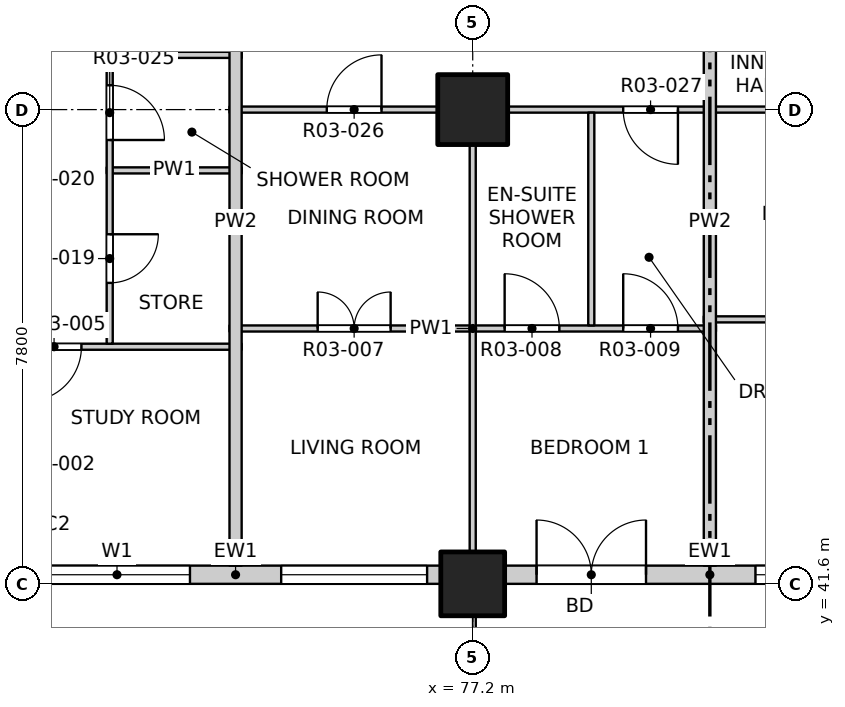
"""IFC4 building model, lengths in metres.
Left out: names, types, materials, properties, quantities, classifications, styles, units other than length and angle.
Written with IfcOpenShell. Run it as: python <this file> out.ifc"""

import sys

from ifc_helpers import new_model, si_unit, direction, frame, frame_2d, origin, origin_2d, place, context, subcontext, project, spatial, rectangle, extrude, element, fill, save


model = new_model("IFC4")
c1 = context("Model", 3, precision=1e-05, world=origin(), true_north=direction((0.0, 1.0)))
c2 = subcontext(c1, "Body", "Model", "MODEL_VIEW")
j1 = project(units=[si_unit("LENGTHUNIT", "METRE"), si_unit("PLANEANGLEUNIT", "RADIAN")], contexts=[c1])
p1 = place(None, origin())
s1 = spatial("IfcSite", under=j1, at=p1, CompositionType="ELEMENT")
p2 = place(p1, origin())
s2 = spatial("IfcBuilding", under=s1, at=p2, CompositionType="ELEMENT")
p3 = place(p2, frame((0.0, 0.0, 39.9)))
s3 = spatial("IfcBuildingStorey", under=s2, at=p3, CompositionType="ELEMENT", Elevation=39.9)
p4 = place(p3, frame((77.2, 41.6, -0.25), z_axis=(0.0, 0.0, 1.0), x_axis=(1.0, 0.0, 0.0)))
e1 = element("IfcColumn", 1, at=p4, inside=s3, PredefinedType="COLUMN", context=c2, shape_type="SweptSolid", body=[
    extrude(rectangle(XDim=1.05, YDim=1.05, at=origin_2d()), origin(), (0.0, 0.0, 1.0), 3.4),
])
p5 = place(p3, frame((77.2, 49.4, -0.25), z_axis=(0.0, 0.0, 1.0), x_axis=(1.0, 0.0, 0.0)))
e2 = element("IfcColumn", 2, at=p5, inside=s3, PredefinedType="COLUMN", context=c2, shape_type="SweptSolid", body=[
    extrude(rectangle(XDim=1.15, YDim=1.15, at=origin_2d()), origin(), (0.0, 0.0, 1.0), 3.4),
])
p6 = place(p3, frame((69.925, 41.75, 0.0), z_axis=(0.0, 0.0, 1.0), x_axis=(1.0, 0.0, 0.0)))
e3 = element("IfcWall", 3, at=p6, inside=s3, PredefinedType="SOLIDWALL", context=c2, shape_type="SweptSolid", body=[
    extrude(rectangle(XDim=6.75, YDim=0.3, at=frame_2d((3.375, 0.0))), origin(), (0.0, 0.0, 1.0), 2.7),
])
p7 = place(p6, frame((0.225, 0.0, 0.9)))
e4 = element("IfcOpeningElement", 4, at=p7, cuts=e3, PredefinedType="OPENING", context=c2, shape_type="SweptSolid", body=[
    extrude(rectangle(XDim=2.4, YDim=1.8, at=frame_2d((1.2, 0.9))), frame((0.0, 0.16, 0.0), z_axis=(0.0, -1.0, 0.0), x_axis=(1.0, 0.0, 0.0)), (0.0, 0.0, 1.0), 0.32),
])
p8 = place(p6, frame((4.125, 0.0, 0.9)))
e5 = element("IfcOpeningElement", 5, at=p8, cuts=e3, PredefinedType="OPENING", context=c2, shape_type="SweptSolid", body=[
    extrude(rectangle(XDim=2.4, YDim=1.8, at=frame_2d((1.2, 0.9))), frame((0.0, 0.16, 0.0), z_axis=(0.0, -1.0, 0.0), x_axis=(1.0, 0.0, 0.0)), (0.0, 0.0, 1.0), 0.32),
])
p9 = place(p3, frame((77.725, 41.75, 0.0), z_axis=(0.0, 0.0, 1.0), x_axis=(1.0, 0.0, 0.0)))
e6 = element("IfcWall", 6, at=p9, inside=s3, PredefinedType="SOLIDWALL", context=c2, shape_type="SweptSolid", body=[
    extrude(rectangle(XDim=6.75, YDim=0.3, at=frame_2d((3.375, 0.0))), origin(), (0.0, 0.0, 1.0), 2.7),
])
p10 = place(p9, frame((0.525, 0.0, 0.0)))
e7 = element("IfcOpeningElement", 7, at=p10, cuts=e6, PredefinedType="OPENING", context=c2, shape_type="SweptSolid", body=[
    extrude(rectangle(XDim=1.8, YDim=2.4, at=frame_2d((0.9, 1.2))), frame((0.0, 0.16, 0.0), z_axis=(0.0, -1.0, 0.0), x_axis=(1.0, 0.0, 0.0)), (0.0, 0.0, 1.0), 0.32),
])
p11 = place(p9, frame((4.125, 0.0, 0.9)))
e8 = element("IfcOpeningElement", 8, at=p11, cuts=e6, PredefinedType="OPENING", context=c2, shape_type="SweptSolid", body=[
    extrude(rectangle(XDim=2.4, YDim=1.8, at=frame_2d((1.2, 0.9))), frame((0.0, 0.16, 0.0), z_axis=(0.0, -1.0, 0.0), x_axis=(1.0, 0.0, 0.0)), (0.0, 0.0, 1.0), 0.32),
])
p12 = place(p3, frame((61.9, 45.5, 0.0), z_axis=(0.0, 0.0, 1.0), x_axis=(1.0, 0.0, 0.0)))
e9 = element("IfcWall", 9, at=p12, inside=s3, PredefinedType="PARTITIONING", context=c2, shape_type="SweptSolid", body=[
    extrude(rectangle(XDim=11.5, YDim=0.1, at=frame_2d((5.75, 0.0))), origin(), (0.0, 0.0, 1.0), 3.15),
])
p13 = place(p12, frame((7.965, 0.0, 0.0)))
e10 = element("IfcOpeningElement", 10, at=p13, cuts=e9, PredefinedType="OPENING", context=c2, shape_type="SweptSolid", body=[
    extrude(rectangle(XDim=0.9, YDim=2.1, at=frame_2d((0.45, 1.05))), frame((0.0, 0.06, 0.0), z_axis=(0.0, -1.0, 0.0), x_axis=(1.0, 0.0, 0.0)), (0.0, 0.0, 1.0), 0.12),
])
p14 = place(p3, frame((73.2, 45.8, 0.0), z_axis=(0.0, 0.0, 1.0), x_axis=(1.0, 0.0, 0.0)))
e11 = element("IfcWall", 11, at=p14, inside=s3, PredefinedType="PARTITIONING", context=c2, shape_type="SweptSolid", body=[
    extrude(rectangle(XDim=8.0, YDim=0.1, at=frame_2d((4.0, 0.0))), origin(), (0.0, 0.0, 1.0), 3.15),
])
p15 = place(p14, frame((1.45, 0.0, 0.0)))
e12 = element("IfcOpeningElement", 12, at=p15, cuts=e11, PredefinedType="OPENING", context=c2, shape_type="SweptSolid", body=[
    extrude(rectangle(XDim=1.2, YDim=2.1, at=frame_2d((0.6, 1.05))), frame((0.0, 0.06, 0.0), z_axis=(0.0, -1.0, 0.0), x_axis=(1.0, 0.0, 0.0)), (0.0, 0.0, 1.0), 0.12),
])
p16 = place(p14, frame((4.525, 0.0, 0.0)))
e13 = element("IfcOpeningElement", 13, at=p16, cuts=e11, PredefinedType="OPENING", context=c2, shape_type="SweptSolid", body=[
    extrude(rectangle(XDim=0.9, YDim=2.1, at=frame_2d((0.45, 1.05))), frame((0.0, 0.06, 0.0), z_axis=(0.0, -1.0, 0.0), x_axis=(1.0, 0.0, 0.0)), (0.0, 0.0, 1.0), 0.12),
])
p17 = place(p14, frame((6.475, 0.0, 0.0)))
e14 = element("IfcOpeningElement", 14, at=p17, cuts=e11, PredefinedType="OPENING", context=c2, shape_type="SweptSolid", body=[
    extrude(rectangle(XDim=0.9, YDim=2.1, at=frame_2d((0.45, 1.05))), frame((0.0, 0.06, 0.0), z_axis=(0.0, -1.0, 0.0), x_axis=(1.0, 0.0, 0.0)), (0.0, 0.0, 1.0), 0.12),
])
p18 = place(p3, frame((81.0, 45.95, 0.0), z_axis=(0.0, 0.0, 1.0), x_axis=(1.0, 0.0, 0.0)))
e15 = element("IfcWall", 15, at=p18, inside=s3, PredefinedType="PARTITIONING", context=c2, shape_type="SweptSolid", body=[
    extrude(rectangle(XDim=8.0, YDim=0.1, at=frame_2d((4.0, 0.0))), origin(), (0.0, 0.0, 1.0), 3.15),
])
p19 = place(p18, frame((1.45, 0.0, 0.0)))
e16 = element("IfcOpeningElement", 16, at=p19, cuts=e15, PredefinedType="OPENING", context=c2, shape_type="SweptSolid", body=[
    extrude(rectangle(XDim=1.2, YDim=2.1, at=frame_2d((0.6, 1.05))), frame((0.0, 0.06, 0.0), z_axis=(0.0, -1.0, 0.0), x_axis=(1.0, 0.0, 0.0)), (0.0, 0.0, 1.0), 0.12),
])
p20 = place(p18, frame((4.525, 0.0, 0.0)))
e17 = element("IfcOpeningElement", 17, at=p20, cuts=e15, PredefinedType="OPENING", context=c2, shape_type="SweptSolid", body=[
    extrude(rectangle(XDim=0.9, YDim=2.1, at=frame_2d((0.45, 1.05))), frame((0.0, 0.06, 0.0), z_axis=(0.0, -1.0, 0.0), x_axis=(1.0, 0.0, 0.0)), (0.0, 0.0, 1.0), 0.12),
])
p21 = place(p18, frame((6.475, 0.0, 0.0)))
e18 = element("IfcOpeningElement", 18, at=p21, cuts=e15, PredefinedType="OPENING", context=c2, shape_type="SweptSolid", body=[
    extrude(rectangle(XDim=0.9, YDim=2.1, at=frame_2d((0.45, 1.05))), frame((0.0, 0.06, 0.0), z_axis=(0.0, -1.0, 0.0), x_axis=(1.0, 0.0, 0.0)), (0.0, 0.0, 1.0), 0.12),
])
p22 = place(p3, frame((71.18, 48.4, 0.0), z_axis=(0.0, 0.0, 1.0), x_axis=(1.0, 0.0, 0.0)))
e19 = element("IfcWall", 19, at=p22, inside=s3, PredefinedType="PARTITIONING", context=c2, shape_type="SweptSolid", body=[
    extrude(rectangle(XDim=2.22, YDim=0.1, at=frame_2d((1.11, 0.0))), origin(), (0.0, 0.0, 1.0), 3.15),
])
p23 = place(p3, frame((73.2, 49.4, 0.0), z_axis=(0.0, 0.0, 1.0), x_axis=(1.0, 0.0, 0.0)))
e20 = element("IfcWall", 20, at=p23, inside=s3, PredefinedType="PARTITIONING", context=c2, shape_type="SweptSolid", body=[
    extrude(rectangle(XDim=23.6, YDim=0.1, at=frame_2d((11.8, 0.0))), origin(), (0.0, 0.0, 1.0), 3.15),
])
p24 = place(p23, frame((1.6, 0.0, 0.0)))
e21 = element("IfcOpeningElement", 21, at=p24, cuts=e20, PredefinedType="OPENING", context=c2, shape_type="SweptSolid", body=[
    extrude(rectangle(XDim=0.9, YDim=2.1, at=frame_2d((0.45, 1.05))), frame((0.0, 0.06, 0.0), z_axis=(0.0, -1.0, 0.0), x_axis=(1.0, 0.0, 0.0)), (0.0, 0.0, 1.0), 0.12),
])
p25 = place(p23, frame((6.475, 0.0, 0.0)))
e22 = element("IfcOpeningElement", 22, at=p25, cuts=e20, PredefinedType="OPENING", context=c2, shape_type="SweptSolid", body=[
    extrude(rectangle(XDim=0.9, YDim=2.1, at=frame_2d((0.45, 1.05))), frame((0.0, 0.06, 0.0), z_axis=(0.0, -1.0, 0.0), x_axis=(1.0, 0.0, 0.0)), (0.0, 0.0, 1.0), 0.12),
])
p26 = place(p23, frame((9.4, 0.0, 0.0)))
e23 = element("IfcOpeningElement", 23, at=p26, cuts=e20, PredefinedType="OPENING", context=c2, shape_type="SweptSolid", body=[
    extrude(rectangle(XDim=0.9, YDim=2.1, at=frame_2d((0.45, 1.05))), frame((0.0, 0.06, 0.0), z_axis=(0.0, -1.0, 0.0), x_axis=(1.0, 0.0, 0.0)), (0.0, 0.0, 1.0), 0.12),
])
p27 = place(p23, frame((14.275, 0.0, 0.0)))
e24 = element("IfcOpeningElement", 24, at=p27, cuts=e20, PredefinedType="OPENING", context=c2, shape_type="SweptSolid", body=[
    extrude(rectangle(XDim=0.9, YDim=2.1, at=frame_2d((0.45, 1.05))), frame((0.0, 0.06, 0.0), z_axis=(0.0, -1.0, 0.0), x_axis=(1.0, 0.0, 0.0)), (0.0, 0.0, 1.0), 0.12),
])
p28 = place(p23, frame((18.0, 0.0, 0.0)))
e25 = element("IfcOpeningElement", 25, at=p28, cuts=e20, PredefinedType="OPENING", context=c2, shape_type="SweptSolid", body=[
    extrude(rectangle(XDim=0.9, YDim=2.1, at=frame_2d((0.45, 1.05))), frame((0.0, 0.06, 0.0), z_axis=(0.0, -1.0, 0.0), x_axis=(1.0, 0.0, 0.0)), (0.0, 0.0, 1.0), 0.12),
])
p29 = place(p23, frame((21.1, 0.0, 0.0)))
e26 = element("IfcOpeningElement", 26, at=p29, cuts=e20, PredefinedType="OPENING", context=c2, shape_type="SweptSolid", body=[
    extrude(rectangle(XDim=0.9, YDim=2.1, at=frame_2d((0.45, 1.05))), frame((0.0, 0.06, 0.0), z_axis=(0.0, -1.0, 0.0), x_axis=(1.0, 0.0, 0.0)), (0.0, 0.0, 1.0), 0.12),
])
p30 = place(p3, frame((71.18, 50.3, 0.0), z_axis=(0.0, 0.0, 1.0), x_axis=(1.0, 0.0, 0.0)))
e27 = element("IfcWall", 27, at=p30, inside=s3, PredefinedType="PARTITIONING", context=c2, shape_type="SweptSolid", body=[
    extrude(rectangle(XDim=2.22, YDim=0.1, at=frame_2d((1.11, 0.0))), origin(), (0.0, 0.0, 1.0), 3.15),
])
p31 = place(p3, frame((71.23, 45.55, 0.0), z_axis=(0.0, 0.0, 1.0), x_axis=(0.0, 1.0, 0.0)))
e28 = element("IfcWall", 28, at=p31, inside=s3, PredefinedType="PARTITIONING", context=c2, shape_type="SweptSolid", body=[
    extrude(rectangle(XDim=12.3, YDim=0.1, at=frame_2d((6.15, 0.0))), origin(), (0.0, 0.0, 1.0), 3.15),
])
p32 = place(p31, frame((1.0, 0.0, 0.0)))
e29 = element("IfcOpeningElement", 29, at=p32, cuts=e28, PredefinedType="OPENING", context=c2, shape_type="SweptSolid", body=[
    extrude(rectangle(XDim=0.8, YDim=2.1, at=frame_2d((0.4, 1.05))), frame((0.0, 0.06, 0.0), z_axis=(0.0, -1.0, 0.0), x_axis=(1.0, 0.0, 0.0)), (0.0, 0.0, 1.0), 0.12),
])
p33 = place(p31, frame((3.35, 0.0, 0.0)))
e30 = element("IfcOpeningElement", 30, at=p33, cuts=e28, PredefinedType="OPENING", context=c2, shape_type="SweptSolid", body=[
    extrude(rectangle(XDim=0.9, YDim=2.1, at=frame_2d((0.45, 1.05))), frame((0.0, 0.06, 0.0), z_axis=(0.0, -1.0, 0.0), x_axis=(1.0, 0.0, 0.0)), (0.0, 0.0, 1.0), 0.12),
])
p34 = place(p31, frame((5.8, 0.0, 0.0)))
e31 = element("IfcOpeningElement", 31, at=p34, cuts=e28, PredefinedType="OPENING", context=c2, shape_type="SweptSolid", body=[
    extrude(rectangle(XDim=0.8, YDim=2.1, at=frame_2d((0.4, 1.05))), frame((0.0, 0.06, 0.0), z_axis=(0.0, -1.0, 0.0), x_axis=(1.0, 0.0, 0.0)), (0.0, 0.0, 1.0), 0.12),
])
p35 = place(p31, frame((8.4, 0.0, 0.0)))
e32 = element("IfcOpeningElement", 32, at=p35, cuts=e28, PredefinedType="OPENING", context=c2, shape_type="SweptSolid", body=[
    extrude(rectangle(XDim=0.8, YDim=2.1, at=frame_2d((0.4, 1.05))), frame((0.0, 0.06, 0.0), z_axis=(0.0, -1.0, 0.0), x_axis=(1.0, 0.0, 0.0)), (0.0, 0.0, 1.0), 0.12),
])
p36 = place(p31, frame((10.7, 0.0, 0.0)))
e33 = element("IfcOpeningElement", 33, at=p36, cuts=e28, PredefinedType="OPENING", context=c2, shape_type="SweptSolid", body=[
    extrude(rectangle(XDim=0.9, YDim=2.1, at=frame_2d((0.45, 1.05))), frame((0.0, 0.06, 0.0), z_axis=(0.0, -1.0, 0.0), x_axis=(1.0, 0.0, 0.0)), (0.0, 0.0, 1.0), 0.12),
])
p37 = place(p3, frame((73.3, 41.9, 0.0), z_axis=(0.0, 0.0, 1.0), x_axis=(0.0, 1.0, 0.0)))
e34 = element("IfcWall", 34, at=p37, inside=s3, PredefinedType="PARTITIONING", context=c2, shape_type="SweptSolid", body=[
    extrude(rectangle(XDim=11.3, YDim=0.2, at=frame_2d((5.65, 0.0))), origin(), (0.0, 0.0, 1.0), 3.15),
])
p38 = place(p3, frame((77.2, 41.9, 0.0), z_axis=(0.0, 0.0, 1.0), x_axis=(0.0, 1.0, 0.0)))
e35 = element("IfcWall", 35, at=p38, inside=s3, PredefinedType="PARTITIONING", context=c2, shape_type="SweptSolid", body=[
    extrude(rectangle(XDim=7.45, YDim=0.1, at=frame_2d((3.725, 0.0))), origin(), (0.0, 0.0, 1.0), 2.55),
])
p39 = place(p3, frame((79.15, 45.85, 0.0), z_axis=(0.0, 0.0, 1.0), x_axis=(0.0, 1.0, 0.0)))
e36 = element("IfcWall", 36, at=p39, inside=s3, PredefinedType="PARTITIONING", context=c2, shape_type="SweptSolid", body=[
    extrude(rectangle(XDim=3.5, YDim=0.1, at=frame_2d((1.75, 0.0))), origin(), (0.0, 0.0, 1.0), 3.15),
])
p40 = place(p3, frame((81.1, 41.9, 0.0), z_axis=(0.0, 0.0, 1.0), x_axis=(0.0, 1.0, 0.0)))
e37 = element("IfcWall", 37, at=p40, inside=s3, PredefinedType="PARTITIONING", context=c2, shape_type="SweptSolid", body=[
    extrude(rectangle(XDim=11.3, YDim=0.2, at=frame_2d((5.65, 0.0))), origin(), (0.0, 0.0, 1.0), 3.15),
])
p41 = place(p7, origin())
e38 = element("IfcWindow", 38, at=p41, inside=s3, PartitioningType="DOUBLE_PANEL_VERTICAL", PredefinedType="WINDOW", context=c2, shape_type="SweptSolid", body=[
    extrude(rectangle(XDim=2.4, YDim=1.8, at=frame_2d((1.2, 0.9))), frame((0.0, 0.03, 0.0), z_axis=(0.0, -1.0, 0.0), x_axis=(1.0, 0.0, 0.0)), (0.0, 0.0, 1.0), 0.06),
])
fill(e4, e38)
p42 = place(p8, origin())
e39 = element("IfcWindow", 39, at=p42, inside=s3, PartitioningType="DOUBLE_PANEL_VERTICAL", PredefinedType="WINDOW", context=c2, shape_type="SweptSolid", body=[
    extrude(rectangle(XDim=2.4, YDim=1.8, at=frame_2d((1.2, 0.9))), frame((0.0, 0.03, 0.0), z_axis=(0.0, -1.0, 0.0), x_axis=(1.0, 0.0, 0.0)), (0.0, 0.0, 1.0), 0.06),
])
fill(e5, e39)
p43 = place(p10, origin())
e40 = element("IfcDoor", 40, at=p43, inside=s3, OperationType="DOUBLE_DOOR_SINGLE_SWING", PredefinedType="DOOR", context=c2, shape_type="SweptSolid", body=[
    extrude(rectangle(XDim=1.8, YDim=2.4, at=frame_2d((0.9, 1.2))), frame((0.0, 0.025, 0.0), z_axis=(0.0, -1.0, 0.0), x_axis=(1.0, 0.0, 0.0)), (0.0, 0.0, 1.0), 0.05),
])
fill(e7, e40)
p44 = place(p11, origin())
e41 = element("IfcWindow", 41, at=p44, inside=s3, PartitioningType="DOUBLE_PANEL_VERTICAL", PredefinedType="WINDOW", context=c2, shape_type="SweptSolid", body=[
    extrude(rectangle(XDim=2.4, YDim=1.8, at=frame_2d((1.2, 0.9))), frame((0.0, 0.03, 0.0), z_axis=(0.0, -1.0, 0.0), x_axis=(1.0, 0.0, 0.0)), (0.0, 0.0, 1.0), 0.06),
])
fill(e8, e41)
p45 = place(p13, origin())
e42 = element("IfcDoor", 42, at=p45, inside=s3, OperationType="SINGLE_SWING_RIGHT", PredefinedType="DOOR", context=c2, shape_type="SweptSolid", body=[
    extrude(rectangle(XDim=0.9, YDim=2.1, at=frame_2d((0.45, 1.05))), frame((0.0, 0.025, 0.0), z_axis=(0.0, -1.0, 0.0), x_axis=(1.0, 0.0, 0.0)), (0.0, 0.0, 1.0), 0.05),
])
fill(e10, e42)
p46 = place(p15, origin())
e43 = element("IfcDoor", 43, at=p46, inside=s3, OperationType="DOUBLE_DOOR_SINGLE_SWING", PredefinedType="DOOR", context=c2, shape_type="SweptSolid", body=[
    extrude(rectangle(XDim=1.2, YDim=2.1, at=frame_2d((0.6, 1.05))), frame((0.0, 0.025, 0.0), z_axis=(0.0, -1.0, 0.0), x_axis=(1.0, 0.0, 0.0)), (0.0, 0.0, 1.0), 0.05),
])
fill(e12, e43)
p47 = place(p16, origin())
e44 = element("IfcDoor", 44, at=p47, inside=s3, OperationType="SINGLE_SWING_LEFT", PredefinedType="DOOR", context=c2, shape_type="SweptSolid", body=[
    extrude(rectangle(XDim=0.9, YDim=2.1, at=frame_2d((0.45, 1.05))), frame((0.0, 0.025, 0.0), z_axis=(0.0, -1.0, 0.0), x_axis=(1.0, 0.0, 0.0)), (0.0, 0.0, 1.0), 0.05),
])
fill(e13, e44)
p48 = place(p17, origin())
e45 = element("IfcDoor", 45, at=p48, inside=s3, OperationType="SINGLE_SWING_LEFT", PredefinedType="DOOR", context=c2, shape_type="SweptSolid", body=[
    extrude(rectangle(XDim=0.9, YDim=2.1, at=frame_2d((0.45, 1.05))), frame((0.0, 0.025, 0.0), z_axis=(0.0, -1.0, 0.0), x_axis=(1.0, 0.0, 0.0)), (0.0, 0.0, 1.0), 0.05),
])
fill(e14, e45)
p49 = place(p32, origin())
e46 = element("IfcDoor", 46, at=p49, inside=s3, OperationType="SINGLE_SWING_LEFT", PredefinedType="DOOR", context=c2, shape_type="SweptSolid", body=[
    extrude(rectangle(XDim=0.8, YDim=2.1, at=frame_2d((0.4, 1.05))), frame((0.0, 0.025, 0.0), z_axis=(0.0, -1.0, 0.0), x_axis=(1.0, 0.0, 0.0)), (0.0, 0.0, 1.0), 0.05),
])
fill(e29, e46)
p50 = place(p33, origin())
e47 = element("IfcDoor", 47, at=p50, inside=s3, OperationType="SINGLE_SWING_RIGHT", PredefinedType="DOOR", context=c2, shape_type="SweptSolid", body=[
    extrude(rectangle(XDim=0.9, YDim=2.1, at=frame_2d((0.45, 1.05))), frame((0.0, 0.025, 0.0), z_axis=(0.0, -1.0, 0.0), x_axis=(1.0, 0.0, 0.0)), (0.0, 0.0, 1.0), 0.05),
])
fill(e30, e47)
p51 = place(p24, origin())
e48 = element("IfcDoor", 48, at=p51, inside=s3, OperationType="SINGLE_SWING_RIGHT", PredefinedType="DOOR", context=c2, shape_type="SweptSolid", body=[
    extrude(rectangle(XDim=0.9, YDim=2.1, at=frame_2d((0.45, 1.05))), frame((0.0, 0.025, 0.0), z_axis=(0.0, -1.0, 0.0), x_axis=(1.0, 0.0, 0.0)), (0.0, 0.0, 1.0), 0.05),
])
fill(e21, e48)
p52 = place(p25, origin())
e49 = element("IfcDoor", 49, at=p52, inside=s3, OperationType="SINGLE_SWING_LEFT", PredefinedType="DOOR", context=c2, shape_type="SweptSolid", body=[
    extrude(rectangle(XDim=0.9, YDim=2.1, at=frame_2d((0.45, 1.05))), frame((0.0, 0.025, 0.0), z_axis=(0.0, -1.0, 0.0), x_axis=(1.0, 0.0, 0.0)), (0.0, 0.0, 1.0), 0.05),
])
fill(e22, e49)
save(model, sys.argv[1])
